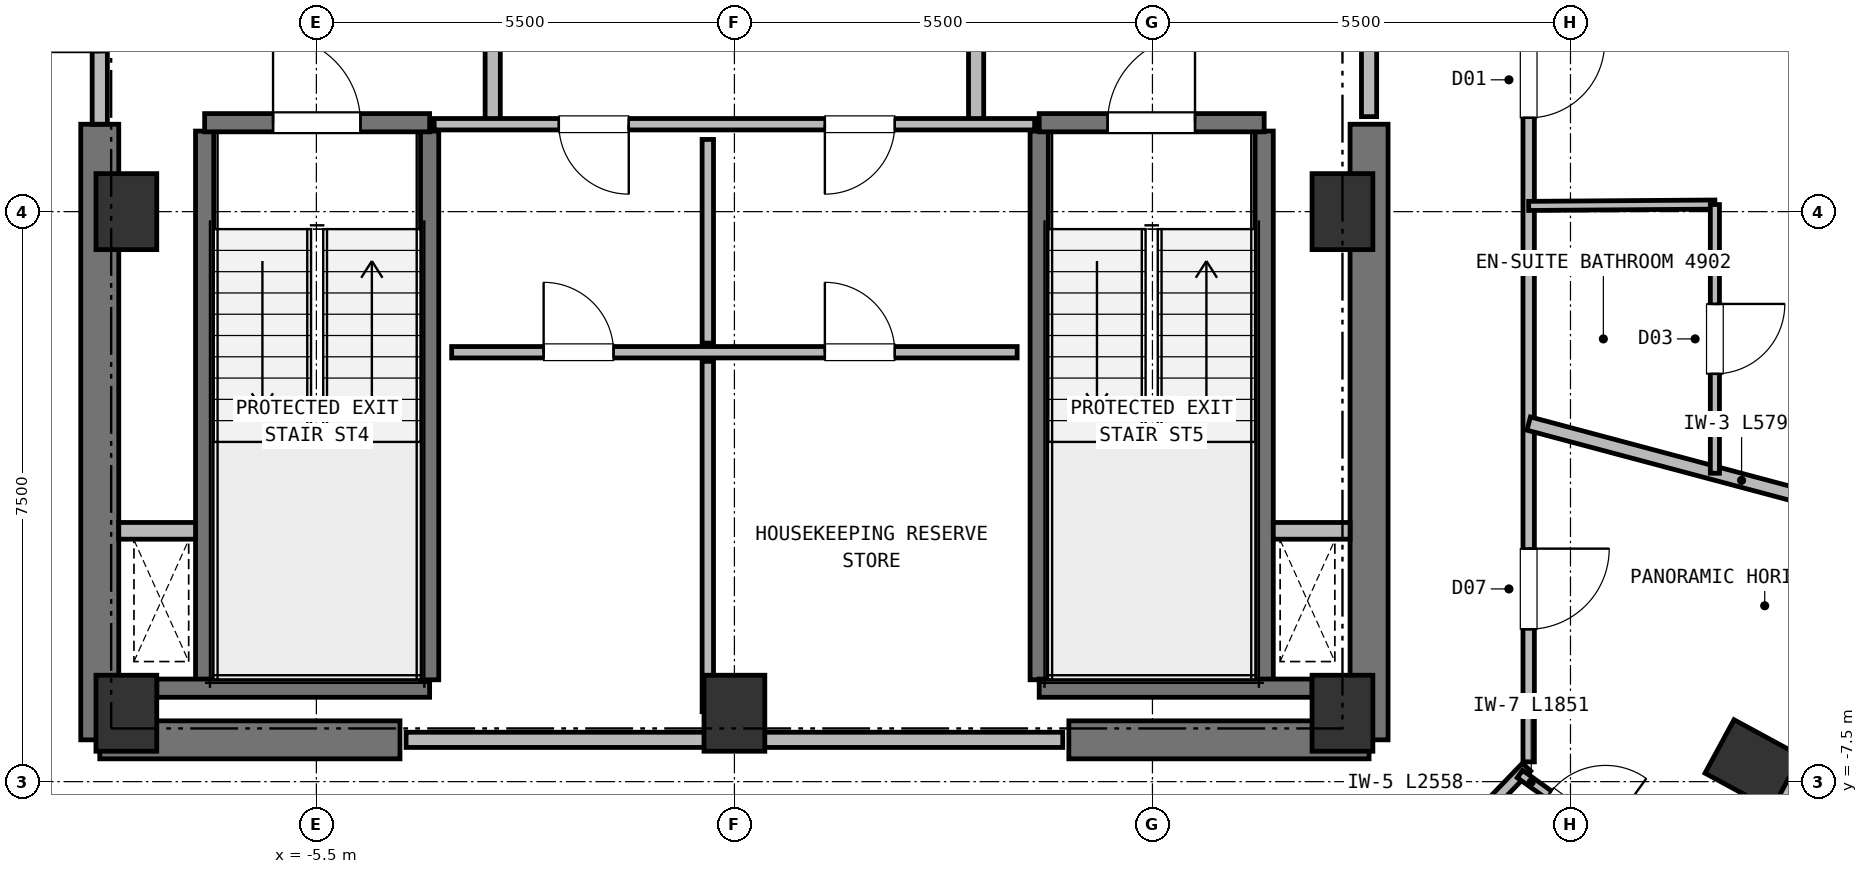
"""IFC4 building model, lengths in metres.
Left out: names, types, materials, properties, quantities, classifications, styles, units other than length and angle.
Written with IfcOpenShell. Run it as: python <this file> out.ifc"""

import sys

from ifc_helpers import new_model, si_unit, direction, frame, frame_2d, origin, origin_2d, place, context, subcontext, project, spatial, rectangle, extrude, element, fill, save


model = new_model("IFC4")
c1 = context("Model", 3, precision=1e-05, world=origin(), true_north=direction((0.0, 1.0)))
c2 = subcontext(c1, "Body", "Model", "MODEL_VIEW")
j1 = project(units=[si_unit("LENGTHUNIT", "METRE"), si_unit("PLANEANGLEUNIT", "RADIAN")], contexts=[c1])
p1 = place(None, origin())
s1 = spatial("IfcSite", under=j1, at=p1, CompositionType="ELEMENT")
p2 = place(p1, origin())
s2 = spatial("IfcBuilding", under=s1, at=p2, CompositionType="ELEMENT")
p3 = place(p2, frame((0.0, 0.0, 186.55)))
s3 = spatial("IfcBuildingStorey", under=s2, at=p3, CompositionType="ELEMENT", Elevation=186.55)
for number, where, z_axis, x_axis in (
    (1, (-8.0, -6.6, 0.0), (0.0, 0.0, 1.0), (1.0, 0.0, 0.0)),
    (2, (0.0, -6.6, 0.0), (0.0, 0.0, 1.0), (1.0, 0.0, 0.0)),
    (3, (8.0, -6.6, 0.0), (0.0, 0.0, 1.0), (1.0, 0.0, 0.0)),
    (4, (8.0, 0.0, 0.0), (0.0, 0.0, 1.0), (1.0, 0.0, 0.0)),
    (5, (-8.0, 0.0, 0.0), (0.0, 0.0, 1.0), (1.0, 0.0, 0.0)),
):
    element("IfcColumn", number, at=place(p3, frame(where, z_axis=z_axis, x_axis=x_axis)), inside=s3, PredefinedType="COLUMN", context=c2, shape_type="SweptSolid", body=[
        extrude(rectangle(XDim=0.8, YDim=1.0, at=origin_2d()), origin(), (0.0, 0.0, 1.0), 3.8),
    ])
for number, where, z_axis, x_axis in (
    (6, (-8.35, -6.95, 0.0), (0.0, 0.0, 1.0), (1.0, 0.0, 0.0)),
    (7, (4.4, -6.95, 0.0), (0.0, 0.0, 1.0), (1.0, 0.0, 0.0)),
):
    element("IfcWall", number, at=place(p3, frame(where, z_axis=z_axis, x_axis=x_axis)), inside=s3, PredefinedType="SHEAR", context=c2, shape_type="SweptSolid", body=[
        extrude(rectangle(XDim=3.95, YDim=0.5, at=frame_2d((1.975, 0.0))), origin(), (0.0, 0.0, 1.0), 3.55),
    ])
for number, where, z_axis, x_axis in (
    (8, (-8.35, -6.95, 0.0), (0.0, 0.0, 1.0), (0.0, 1.0, 0.0)),
    (9, (8.35, -6.95, 0.0), (0.0, 0.0, 1.0), (0.0, 1.0, 0.0)),
):
    element("IfcWall", number, at=place(p3, frame(where, z_axis=z_axis, x_axis=x_axis)), inside=s3, PredefinedType="SHEAR", context=c2, shape_type="SweptSolid", body=[
        extrude(rectangle(XDim=8.1, YDim=0.5, at=frame_2d((4.05, 0.0))), origin(), (0.0, 0.0, 1.0), 3.55),
    ])
p4 = place(p3, frame((13.4, -7.276, 0.0), z_axis=(0.0, 0.0, 1.0), x_axis=(0.47715876026, 0.878817112662, 0.0)))
e10 = element("IfcColumn", 10, at=p4, inside=s3, PredefinedType="COLUMN", context=c2, shape_type="SweptSolid", body=[
    extrude(rectangle(XDim=0.8, YDim=1.0, at=origin_2d()), origin(), (0.0, 0.0, 1.0), 3.8),
])
p5 = place(p3, frame((14.244, -7.209, 0.0), z_axis=(0.0, 0.0, 1.0), x_axis=(-0.5707327312, -0.821135889812, 0.0)))
e11 = element("IfcWall", 11, at=p5, inside=s3, PredefinedType="SOLIDWALL", context=c2, shape_type="SweptSolid", body=[
    extrude(rectangle(XDim=2.566, YDim=0.33, at=frame_2d((1.283, 0.0))), origin(), (0.0, 0.0, 1.0), 3.55),
])
p6 = place(p3, frame((-6.97, -6.16, 0.0), z_axis=(0.0, 0.0, 1.0), x_axis=(0.0, 1.0, 0.0)))
e12 = element("IfcWall", 12, at=p6, inside=s3, PredefinedType="SHEAR", context=c2, shape_type="SweptSolid", body=[
    extrude(rectangle(XDim=7.22, YDim=0.24, at=frame_2d((3.61, 0.0))), origin(), (0.0, 0.0, 1.0), 3.55),
])
p7 = place(p3, frame((-7.6, -6.27, 0.0), z_axis=(0.0, 0.0, 1.0), x_axis=(1.0, 0.0, 0.0)))
e13 = element("IfcWall", 13, at=p7, inside=s3, PredefinedType="SHEAR", context=c2, shape_type="SweptSolid", body=[
    extrude(rectangle(XDim=3.59, YDim=0.24, at=frame_2d((1.795, 0.0))), origin(), (0.0, 0.0, 1.0), 3.55),
])
p8 = place(p3, frame((-4.01, -6.16, 0.0), z_axis=(0.0, 0.0, 1.0), x_axis=(0.0, 1.0, 0.0)))
e14 = element("IfcWall", 14, at=p8, inside=s3, PredefinedType="SHEAR", context=c2, shape_type="SweptSolid", body=[
    extrude(rectangle(XDim=7.22, YDim=0.24, at=frame_2d((3.61, 0.0))), origin(), (0.0, 0.0, 1.0), 3.55),
])
p9 = place(p3, frame((-6.97, 1.17, 0.0), z_axis=(0.0, 0.0, 1.0), x_axis=(1.0, 0.0, 0.0)))
e15 = element("IfcWall", 15, at=p9, inside=s3, PredefinedType="SHEAR", context=c2, shape_type="SweptSolid", body=[
    extrude(rectangle(XDim=2.96, YDim=0.24, at=frame_2d((1.48, 0.0))), origin(), (0.0, 0.0, 1.0), 3.55),
])
p10 = place(p9, frame((0.9, 0.0, 0.0)))
e16 = element("IfcOpeningElement", 16, at=p10, cuts=e15, PredefinedType="OPENING", context=c2, shape_type="SweptSolid", body=[
    extrude(rectangle(XDim=1.15, YDim=2.15, at=frame_2d((0.575, 1.075))), frame((0.0, 0.13, 0.0), z_axis=(0.0, -1.0, 0.0), x_axis=(1.0, 0.0, 0.0)), (0.0, 0.0, 1.0), 0.26),
])
for number, where, z_axis, x_axis in (
    (17, (4.01, -6.16, 0.0), (0.0, 0.0, 1.0), (0.0, 1.0, 0.0)),
    (18, (6.97, -6.16, 0.0), (0.0, 0.0, 1.0), (0.0, 1.0, 0.0)),
):
    element("IfcWall", number, at=place(p3, frame(where, z_axis=z_axis, x_axis=x_axis)), inside=s3, PredefinedType="SHEAR", context=c2, shape_type="SweptSolid", body=[
        extrude(rectangle(XDim=7.22, YDim=0.24, at=frame_2d((3.61, 0.0))), origin(), (0.0, 0.0, 1.0), 3.55),
    ])
p11 = place(p3, frame((4.01, -6.27, 0.0), z_axis=(0.0, 0.0, 1.0), x_axis=(1.0, 0.0, 0.0)))
e19 = element("IfcWall", 19, at=p11, inside=s3, PredefinedType="SHEAR", context=c2, shape_type="SweptSolid", body=[
    extrude(rectangle(XDim=3.59, YDim=0.24, at=frame_2d((1.795, 0.0))), origin(), (0.0, 0.0, 1.0), 3.55),
])
p12 = place(p3, frame((4.01, 1.17, 0.0), z_axis=(0.0, 0.0, 1.0), x_axis=(1.0, 0.0, 0.0)))
e20 = element("IfcWall", 20, at=p12, inside=s3, PredefinedType="SHEAR", context=c2, shape_type="SweptSolid", body=[
    extrude(rectangle(XDim=2.96, YDim=0.24, at=frame_2d((1.48, 0.0))), origin(), (0.0, 0.0, 1.0), 3.55),
])
p13 = place(p12, frame((0.9, 0.0, 0.0)))
e21 = element("IfcOpeningElement", 21, at=p13, cuts=e20, PredefinedType="OPENING", context=c2, shape_type="SweptSolid", body=[
    extrude(rectangle(XDim=1.15, YDim=2.15, at=frame_2d((0.575, 1.075))), frame((0.0, 0.13, 0.0), z_axis=(0.0, -1.0, 0.0), x_axis=(1.0, 0.0, 0.0)), (0.0, 0.0, 1.0), 0.26),
])
for number, where, z_axis, x_axis in (
    (22, (-8.1, -4.2, 0.0), (0.0, 0.0, 1.0), (1.0, 0.0, 0.0)),
    (23, (7.09, -4.2, 0.0), (0.0, 0.0, 1.0), (1.0, 0.0, 0.0)),
):
    element("IfcWall", number, at=place(p3, frame(where, z_axis=z_axis, x_axis=x_axis)), inside=s3, PredefinedType="PARTITIONING", context=c2, shape_type="SweptSolid", body=[
        extrude(rectangle(XDim=1.01, YDim=0.22, at=frame_2d((0.505, 0.0))), origin(), (0.0, 0.0, 1.0), 3.55),
    ])
p14 = place(p3, frame((-3.18, 1.15, 0.0), z_axis=(0.0, 0.0, 1.0), x_axis=(0.0, 1.0, 0.0)))
e24 = element("IfcWall", 24, at=p14, inside=s3, PredefinedType="PARTITIONING", context=c2, shape_type="SweptSolid", body=[
    extrude(rectangle(XDim=3.3, YDim=0.2, at=frame_2d((1.65, 0.0))), origin(), (0.0, 0.0, 1.0), 3.55),
])
p15 = place(p14, frame((1.08, 0.0, 0.0)))
e25 = element("IfcOpeningElement", 25, at=p15, cuts=e24, PredefinedType="OPENING", context=c2, shape_type="SweptSolid", body=[
    extrude(rectangle(XDim=1.15, YDim=2.15, at=frame_2d((0.575, 1.075))), frame((0.0, 0.11, 0.0), z_axis=(0.0, -1.0, 0.0), x_axis=(1.0, 0.0, 0.0)), (0.0, 0.0, 1.0), 0.22),
])
p16 = place(p3, frame((3.18, 1.15, 0.0), z_axis=(0.0, 0.0, 1.0), x_axis=(0.0, 1.0, 0.0)))
e26 = element("IfcWall", 26, at=p16, inside=s3, PredefinedType="PARTITIONING", context=c2, shape_type="SweptSolid", body=[
    extrude(rectangle(XDim=3.3, YDim=0.2, at=frame_2d((1.65, 0.0))), origin(), (0.0, 0.0, 1.0), 3.55),
])
p17 = place(p16, frame((1.08, 0.0, 0.0)))
e27 = element("IfcOpeningElement", 27, at=p17, cuts=e26, PredefinedType="OPENING", context=c2, shape_type="SweptSolid", body=[
    extrude(rectangle(XDim=1.15, YDim=2.15, at=frame_2d((0.575, 1.075))), frame((0.0, 0.11, 0.0), z_axis=(0.0, -1.0, 0.0), x_axis=(1.0, 0.0, 0.0)), (0.0, 0.0, 1.0), 0.22),
])
p18 = place(p3, frame((-8.35, 1.15, 0.0), z_axis=(0.0, 0.0, 1.0), x_axis=(0.0, 1.0, 0.0)))
e28 = element("IfcWall", 28, at=p18, inside=s3, PredefinedType="PARTITIONING", context=c2, shape_type="SweptSolid", body=[
    extrude(rectangle(XDim=5.4, YDim=0.2, at=frame_2d((2.7, 0.0))), origin(), (0.0, 0.0, 1.0), 3.55),
])
p19 = place(p18, frame((0.95, 0.0, 0.0)))
e29 = element("IfcOpeningElement", 29, at=p19, cuts=e28, PredefinedType="OPENING", context=c2, shape_type="SweptSolid", body=[
    extrude(rectangle(XDim=1.15, YDim=2.15, at=frame_2d((0.575, 1.075))), frame((0.0, 0.11, 0.0), z_axis=(0.0, -1.0, 0.0), x_axis=(1.0, 0.0, 0.0)), (0.0, 0.0, 1.0), 0.22),
])
p20 = place(p3, frame((8.35, 1.25, 0.0), z_axis=(0.0, 0.0, 1.0), x_axis=(0.0, 1.0, 0.0)))
e30 = element("IfcWall", 30, at=p20, inside=s3, PredefinedType="PARTITIONING", context=c2, shape_type="SweptSolid", body=[
    extrude(rectangle(XDim=5.3, YDim=0.2, at=frame_2d((2.65, 0.0))), origin(), (0.0, 0.0, 1.0), 3.55),
])
p21 = place(p20, frame((0.95, 0.0, 0.0)))
e31 = element("IfcOpeningElement", 31, at=p21, cuts=e30, PredefinedType="OPENING", context=c2, shape_type="SweptSolid", body=[
    extrude(rectangle(XDim=1.15, YDim=2.15, at=frame_2d((0.575, 1.075))), frame((0.0, 0.11, 0.0), z_axis=(0.0, -1.0, 0.0), x_axis=(1.0, 0.0, 0.0)), (0.0, 0.0, 1.0), 0.22),
])
p22 = place(p3, frame((3.95, 1.15, 0.0), z_axis=(0.0, 0.0, 1.0), x_axis=(-1.0, 0.0, 0.0)))
e32 = element("IfcWall", 32, at=p22, inside=s3, PredefinedType="PARTITIONING", context=c2, shape_type="SweptSolid", body=[
    extrude(rectangle(XDim=7.9, YDim=0.15, at=frame_2d((3.95, 0.0))), origin(), (0.0, 0.0, 1.0), 3.55),
])
p23 = place(p22, frame((5.34, 0.0, 0.0)))
e33 = element("IfcOpeningElement", 33, at=p23, cuts=e32, PredefinedType="OPENING", context=c2, shape_type="SweptSolid", body=[
    extrude(rectangle(XDim=0.92, YDim=2.05, at=frame_2d((0.46, 1.025))), frame((0.0, 0.085, 0.0), z_axis=(0.0, -1.0, 0.0), x_axis=(1.0, 0.0, 0.0)), (0.0, 0.0, 1.0), 0.17),
])
p24 = place(p22, frame((1.84, 0.0, 0.0)))
e34 = element("IfcOpeningElement", 34, at=p24, cuts=e32, PredefinedType="OPENING", context=c2, shape_type="SweptSolid", body=[
    extrude(rectangle(XDim=0.92, YDim=2.05, at=frame_2d((0.46, 1.025))), frame((0.0, 0.085, 0.0), z_axis=(0.0, -1.0, 0.0), x_axis=(1.0, 0.0, 0.0)), (0.0, 0.0, 1.0), 0.17),
])
p25 = place(p3, frame((-4.32, -6.95, 0.0), z_axis=(0.0, 0.0, 1.0), x_axis=(1.0, 0.0, 0.0)))
e35 = element("IfcWall", 35, at=p25, inside=s3, PredefinedType="PARTITIONING", context=c2, shape_type="SweptSolid", body=[
    extrude(rectangle(XDim=8.64, YDim=0.2, at=frame_2d((4.32, 0.0))), origin(), (0.0, 0.0, 1.0), 3.55),
])
p26 = place(p3, frame((-3.72, -1.85, 0.0), z_axis=(0.0, 0.0, 1.0), x_axis=(1.0, 0.0, 0.0)))
e36 = element("IfcWall", 36, at=p26, inside=s3, PredefinedType="PARTITIONING", context=c2, shape_type="SweptSolid", body=[
    extrude(rectangle(XDim=7.44, YDim=0.15, at=frame_2d((3.72, 0.0))), origin(), (0.0, 0.0, 1.0), 3.55),
])
p27 = place(p26, frame((1.21, 0.0, 0.0)))
e37 = element("IfcOpeningElement", 37, at=p27, cuts=e36, PredefinedType="OPENING", context=c2, shape_type="SweptSolid", body=[
    extrude(rectangle(XDim=0.92, YDim=2.05, at=frame_2d((0.46, 1.025))), frame((0.0, 0.085, 0.0), z_axis=(0.0, -1.0, 0.0), x_axis=(1.0, 0.0, 0.0)), (0.0, 0.0, 1.0), 0.17),
])
p28 = place(p26, frame((4.91, 0.0, 0.0)))
e38 = element("IfcOpeningElement", 38, at=p28, cuts=e36, PredefinedType="OPENING", context=c2, shape_type="SweptSolid", body=[
    extrude(rectangle(XDim=0.92, YDim=2.05, at=frame_2d((0.46, 1.025))), frame((0.0, 0.085, 0.0), z_axis=(0.0, -1.0, 0.0), x_axis=(1.0, 0.0, 0.0)), (0.0, 0.0, 1.0), 0.17),
])
p29 = place(p3, frame((-0.35, -6.58, 0.0), z_axis=(0.0, 0.0, 1.0), x_axis=(0.0, 1.0, 0.0)))
e39 = element("IfcWall", 39, at=p29, inside=s3, PredefinedType="PARTITIONING", context=c2, shape_type="SweptSolid", body=[
    extrude(rectangle(XDim=4.61, YDim=0.15, at=frame_2d((2.305, 0.0))), origin(), (0.0, 0.0, 1.0), 3.55),
])
p30 = place(p3, frame((-0.35, -1.73, 0.0), z_axis=(0.0, 0.0, 1.0), x_axis=(0.0, 1.0, 0.0)))
e40 = element("IfcWall", 40, at=p30, inside=s3, PredefinedType="PARTITIONING", context=c2, shape_type="SweptSolid", body=[
    extrude(rectangle(XDim=2.68, YDim=0.15, at=frame_2d((1.34, 0.0))), origin(), (0.0, 0.0, 1.0), 3.55),
])
p31 = place(p3, frame((10.422, -7.309, 0.0), z_axis=(0.0, 0.0, 1.0), x_axis=(-0.693764562202, -0.720201869085, 0.0)))
e41 = element("IfcWall", 41, at=p31, inside=s3, PredefinedType="PARTITIONING", context=c2, shape_type="SweptSolid", body=[
    extrude(rectangle(XDim=2.558, YDim=0.15, at=frame_2d((1.279, 0.0))), origin(), (0.0, 0.0, 1.0), 3.23),
])
p32 = place(p3, frame((10.45, 7.24, 0.0), z_axis=(0.0, 0.0, 1.0), x_axis=(0.0, -1.0, 0.0)))
e42 = element("IfcWall", 42, at=p32, inside=s3, PredefinedType="PARTITIONING", context=c2, shape_type="SweptSolid", body=[
    extrude(rectangle(XDim=14.48, YDim=0.15, at=frame_2d((7.24, 0.0))), origin(), (0.0, 0.0, 1.0), 3.55),
])
p33 = place(p32, frame((11.674, 0.0, 0.0)))
e43 = element("IfcOpeningElement", 43, at=p33, cuts=e42, PredefinedType="OPENING", context=c2, shape_type="SweptSolid", body=[
    extrude(rectangle(XDim=1.06, YDim=2.15, at=frame_2d((0.53, 1.075))), frame((0.0, 0.085, 0.0), z_axis=(0.0, -1.0, 0.0), x_axis=(1.0, 0.0, 0.0)), (0.0, 0.0, 1.0), 0.17),
])
p34 = place(p32, frame((5.006, 0.0, 0.0)))
e44 = element("IfcOpeningElement", 44, at=p34, cuts=e42, PredefinedType="OPENING", context=c2, shape_type="SweptSolid", body=[
    extrude(rectangle(XDim=1.0, YDim=2.15, at=frame_2d((0.5, 1.075))), frame((0.0, 0.085, 0.0), z_axis=(0.0, -1.0, 0.0), x_axis=(1.0, 0.0, 0.0)), (0.0, 0.0, 1.0), 0.17),
])
p35 = place(p3, frame((-8.648, -9.151, 0.0), z_axis=(0.0, 0.0, 1.0), x_axis=(-0.693764562202, 0.720201869085, 0.0)))
e45 = element("IfcWall", 45, at=p35, inside=s3, PredefinedType="PARTITIONING", context=c2, shape_type="SweptSolid", body=[
    extrude(rectangle(XDim=2.558, YDim=0.15, at=frame_2d((1.279, 0.0))), origin(), (0.0, 0.0, 1.0), 3.23),
])
p36 = place(p3, frame((10.335, -7.399, 0.0), z_axis=(0.0, 0.0, 1.0), x_axis=(0.813020012063, -0.582235742621, 0.0)))
e46 = element("IfcWall", 46, at=p36, inside=s3, PredefinedType="PARTITIONING", context=c2, shape_type="SweptSolid", body=[
    extrude(rectangle(XDim=1.851, YDim=0.12, at=frame_2d((0.926, 0.0))), origin(), (0.0, 0.0, 1.0), 3.55),
])
p37 = place(p36, frame((0.466, 0.0, 0.0)))
e47 = element("IfcOpeningElement", 47, at=p37, cuts=e46, PredefinedType="OPENING", context=c2, shape_type="SweptSolid", body=[
    extrude(rectangle(XDim=0.92, YDim=2.1, at=frame_2d((0.46, 1.05))), frame((0.0, 0.07, 0.0), z_axis=(0.0, -1.0, 0.0), x_axis=(1.0, 0.0, 0.0)), (0.0, 0.0, 1.0), 0.14),
])
p38 = place(p3, frame((10.45, -2.788, 0.0), z_axis=(0.0, 0.0, 1.0), x_axis=(0.966187404049, -0.257840842879, 0.0)))
e48 = element("IfcWall", 48, at=p38, inside=s3, PredefinedType="PARTITIONING", context=c2, shape_type="SweptSolid", body=[
    extrude(rectangle(XDim=5.799, YDim=0.18, at=frame_2d((2.899, 0.0))), origin(), (0.0, 0.0, 1.0), 3.55),
])
p39 = place(p3, frame((10.45, 0.075, 0.0), z_axis=(0.0, 0.0, 1.0), x_axis=(0.999974261486, 0.007174703221, 0.0)))
e49 = element("IfcWall", 49, at=p39, inside=s3, PredefinedType="PARTITIONING", context=c2, shape_type="SweptSolid", body=[
    extrude(rectangle(XDim=2.45, YDim=0.12, at=frame_2d((1.225, 0.0))), origin(), (0.0, 0.0, 1.0), 3.08),
])
p40 = place(p3, frame((12.9, 0.093, 0.0), z_axis=(0.0, 0.0, 1.0), x_axis=(0.0, -1.0, 0.0)))
e50 = element("IfcWall", 50, at=p40, inside=s3, PredefinedType="PARTITIONING", context=c2, shape_type="SweptSolid", body=[
    extrude(rectangle(XDim=3.535, YDim=0.12, at=frame_2d((1.768, 0.0))), origin(), (0.0, 0.0, 1.0), 3.23),
])
p41 = place(p40, frame((1.308, 0.0, 0.0)))
e51 = element("IfcOpeningElement", 51, at=p41, cuts=e50, PredefinedType="OPENING", context=c2, shape_type="SweptSolid", body=[
    extrude(rectangle(XDim=0.92, YDim=2.1, at=frame_2d((0.46, 1.05))), frame((0.0, 0.07, 0.0), z_axis=(0.0, -1.0, 0.0), x_axis=(1.0, 0.0, 0.0)), (0.0, 0.0, 1.0), 0.14),
])
p42 = place(p10, origin())
e52 = element("IfcDoor", 52, at=p42, inside=s3, OperationType="SINGLE_SWING_LEFT", PredefinedType="DOOR", context=c2, shape_type="SweptSolid", body=[
    extrude(rectangle(XDim=1.15, YDim=2.15, at=frame_2d((0.575, 1.075))), frame((0.0, 0.025, 0.0), z_axis=(0.0, -1.0, 0.0), x_axis=(1.0, 0.0, 0.0)), (0.0, 0.0, 1.0), 0.05),
])
fill(e16, e52)
p43 = place(p13, origin())
e53 = element("IfcDoor", 53, at=p43, inside=s3, OperationType="SINGLE_SWING_RIGHT", PredefinedType="DOOR", context=c2, shape_type="SweptSolid", body=[
    extrude(rectangle(XDim=1.15, YDim=2.15, at=frame_2d((0.575, 1.075))), frame((0.0, 0.025, 0.0), z_axis=(0.0, -1.0, 0.0), x_axis=(1.0, 0.0, 0.0)), (0.0, 0.0, 1.0), 0.05),
])
fill(e21, e53)
p44 = place(p19, origin())
e54 = element("IfcDoor", 54, at=p44, inside=s3, OperationType="SINGLE_SWING_LEFT", PredefinedType="DOOR", context=c2, shape_type="SweptSolid", body=[
    extrude(rectangle(XDim=1.15, YDim=2.15, at=frame_2d((0.575, 1.075))), frame((0.0, 0.025, 0.0), z_axis=(0.0, -1.0, 0.0), x_axis=(1.0, 0.0, 0.0)), (0.0, 0.0, 1.0), 0.05),
])
fill(e29, e54)
p45 = place(p23, origin())
e55 = element("IfcDoor", 55, at=p45, inside=s3, OperationType="SINGLE_SWING_LEFT", PredefinedType="DOOR", context=c2, shape_type="SweptSolid", body=[
    extrude(rectangle(XDim=0.92, YDim=2.05, at=frame_2d((0.46, 1.025))), frame((0.0, 0.025, 0.0), z_axis=(0.0, -1.0, 0.0), x_axis=(1.0, 0.0, 0.0)), (0.0, 0.0, 1.0), 0.05),
])
fill(e33, e55)
p46 = place(p24, origin())
e56 = element("IfcDoor", 56, at=p46, inside=s3, OperationType="SINGLE_SWING_RIGHT", PredefinedType="DOOR", context=c2, shape_type="SweptSolid", body=[
    extrude(rectangle(XDim=0.92, YDim=2.05, at=frame_2d((0.46, 1.025))), frame((0.0, 0.025, 0.0), z_axis=(0.0, -1.0, 0.0), x_axis=(1.0, 0.0, 0.0)), (0.0, 0.0, 1.0), 0.05),
])
fill(e34, e56)
p47 = place(p27, origin())
e57 = element("IfcDoor", 57, at=p47, inside=s3, OperationType="SINGLE_SWING_LEFT", PredefinedType="DOOR", context=c2, shape_type="SweptSolid", body=[
    extrude(rectangle(XDim=0.92, YDim=2.05, at=frame_2d((0.46, 1.025))), frame((0.0, 0.025, 0.0), z_axis=(0.0, -1.0, 0.0), x_axis=(1.0, 0.0, 0.0)), (0.0, 0.0, 1.0), 0.05),
])
fill(e37, e57)
p48 = place(p28, origin())
e58 = element("IfcDoor", 58, at=p48, inside=s3, OperationType="SINGLE_SWING_LEFT", PredefinedType="DOOR", context=c2, shape_type="SweptSolid", body=[
    extrude(rectangle(XDim=0.92, YDim=2.05, at=frame_2d((0.46, 1.025))), frame((0.0, 0.025, 0.0), z_axis=(0.0, -1.0, 0.0), x_axis=(1.0, 0.0, 0.0)), (0.0, 0.0, 1.0), 0.05),
])
fill(e38, e58)
p49 = place(p37, origin())
e59 = element("IfcDoor", 59, at=p49, inside=s3, OperationType="SINGLE_SWING_RIGHT", PredefinedType="DOOR", context=c2, shape_type="SweptSolid", body=[
    extrude(rectangle(XDim=0.92, YDim=2.1, at=frame_2d((0.46, 1.05))), frame((0.0, 0.025, 0.0), z_axis=(0.0, -1.0, 0.0), x_axis=(1.0, 0.0, 0.0)), (0.0, 0.0, 1.0), 0.05),
])
fill(e47, e59)
p50 = place(p41, origin())
e60 = element("IfcDoor", 60, at=p50, inside=s3, OperationType="SINGLE_SWING_LEFT", PredefinedType="DOOR", context=c2, shape_type="SweptSolid", body=[
    extrude(rectangle(XDim=0.92, YDim=2.1, at=frame_2d((0.46, 1.05))), frame((0.0, 0.025, 0.0), z_axis=(0.0, -1.0, 0.0), x_axis=(1.0, 0.0, 0.0)), (0.0, 0.0, 1.0), 0.05),
])
fill(e51, e60)
p51 = place(p33, origin())
e61 = element("IfcDoor", 61, at=p51, inside=s3, OperationType="SINGLE_SWING_LEFT", PredefinedType="DOOR", context=c2, shape_type="SweptSolid", body=[
    extrude(rectangle(XDim=1.06, YDim=2.15, at=frame_2d((0.53, 1.075))), frame((0.0, 0.025, 0.0), z_axis=(0.0, -1.0, 0.0), x_axis=(1.0, 0.0, 0.0)), (0.0, 0.0, 1.0), 0.05),
])
fill(e43, e61)
p52 = place(p34, origin())
e62 = element("IfcDoor", 62, at=p52, inside=s3, OperationType="SINGLE_SWING_LEFT", PredefinedType="DOOR", context=c2, shape_type="SweptSolid", body=[
    extrude(rectangle(XDim=1.0, YDim=2.15, at=frame_2d((0.5, 1.075))), frame((0.0, 0.025, 0.0), z_axis=(0.0, -1.0, 0.0), x_axis=(1.0, 0.0, 0.0)), (0.0, 0.0, 1.0), 0.05),
])
fill(e44, e62)
save(model, sys.argv[1])
